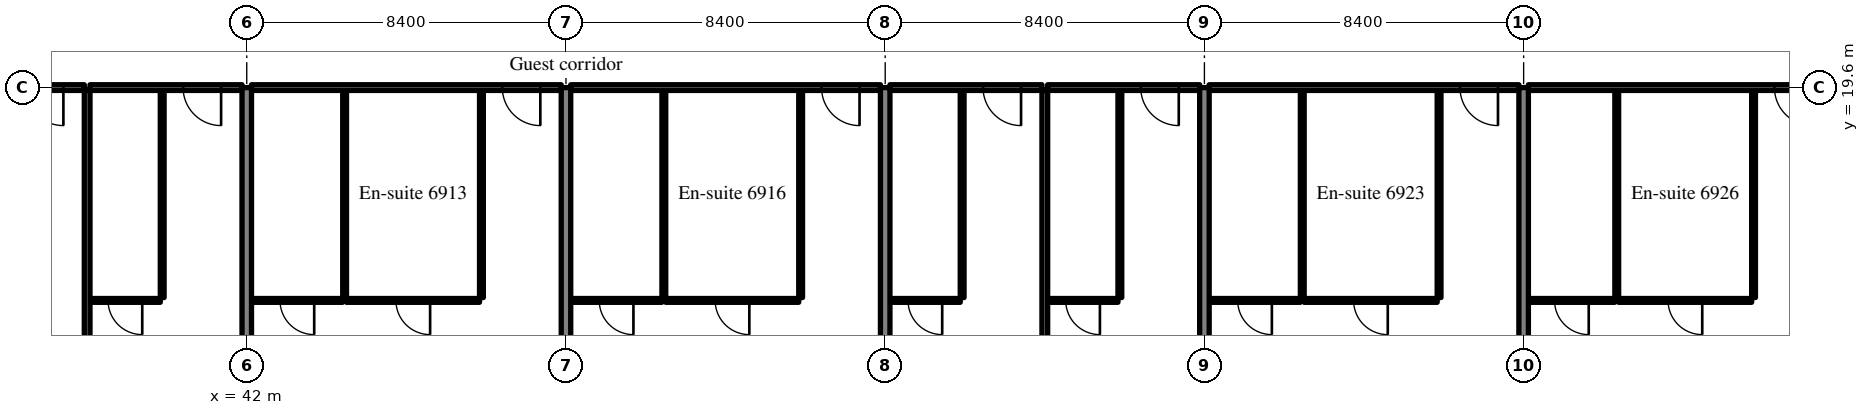
"""IFC4 building model, lengths in metres.
Left out: names, types, materials, properties, quantities, classifications, styles, units other than length and angle.
Written with IfcOpenShell. Run it as: python <this file> out.ifc"""

import sys

from ifc_helpers import new_model, si_unit, direction, frame, frame_2d, origin, place, context, subcontext, project, spatial, rectangle, extrude, source, transform, mapped, element, fill, save


model = new_model("IFC4")
c1 = context("Model", 3, precision=1e-05, world=origin(), true_north=direction((0.0, 1.0)))
c2 = subcontext(c1, "Body", "Model", "MODEL_VIEW")
j1 = project(units=[si_unit("LENGTHUNIT", "METRE"), si_unit("PLANEANGLEUNIT", "RADIAN")], contexts=[c1])
p1 = place(None, origin())
s1 = spatial("IfcSite", under=j1, at=p1, CompositionType="ELEMENT")
p2 = place(p1, origin())
s2 = spatial("IfcBuilding", under=s1, at=p2, CompositionType="ELEMENT")
p3 = place(p2, frame((0.0, 0.0, 289.7)))
s3 = spatial("IfcBuildingStorey", under=s2, at=p3, CompositionType="ELEMENT", Elevation=289.7)
m1 = source(origin(), c2, "Body", "SweptSolid", [
    extrude(rectangle(XDim=14.1, YDim=0.25, at=frame_2d((7.05, 0.0))), origin(), (0.0, 0.0, 1.0), 3.72),
])
p4 = place(p3, frame((42.0, 5.5, 0.0), z_axis=(0.0, 0.0, 1.0), x_axis=(0.0, 1.0, 0.0)))
e1 = element("IfcWall", 1, at=p4, inside=s3, PredefinedType="SHEAR", context=c2, shape_type="MappedRepresentation", body=[
    mapped(m1, transform((0.0, 0.0, 0.0), scale=1.0)),
])
m2 = source(origin(), c2, "Body", "SweptSolid", [
    extrude(rectangle(XDim=13.1, YDim=0.25, at=frame_2d((6.55, 0.0))), origin(), (0.0, 0.0, 1.0), 3.72),
])
p5 = place(p3, frame((50.4, 6.5, 0.0), z_axis=(0.0, 0.0, 1.0), x_axis=(0.0, 1.0, 0.0)))
e2 = element("IfcWall", 2, at=p5, inside=s3, PredefinedType="SHEAR", context=c2, shape_type="MappedRepresentation", body=[
    mapped(m2, transform((0.0, 0.0, 0.0), scale=1.0)),
])
for number, where, z_axis, x_axis in (
    (3, (58.8, 5.5, 0.0), (0.0, 0.0, 1.0), (0.0, 1.0, 0.0)),
    (4, (67.2, 5.5, 0.0), (0.0, 0.0, 1.0), (0.0, 1.0, 0.0)),
    (5, (75.6, 5.5, 0.0), (0.0, 0.0, 1.0), (0.0, 1.0, 0.0)),
):
    element("IfcWall", number, at=place(p3, frame(where, z_axis=z_axis, x_axis=x_axis)), inside=s3, PredefinedType="SHEAR", context=c2, shape_type="MappedRepresentation", body=[
        mapped(m1, transform((0.0, 0.0, 0.0), scale=1.0)),
    ])
m3 = source(origin(), c2, "Body", "SweptSolid", [
    extrude(rectangle(XDim=4.0, YDim=0.15, at=frame_2d((2.0, 0.0))), origin(), (0.0, 0.0, 1.0), 3.02),
])
p6 = place(p3, frame((33.725, 19.6, 0.0), z_axis=(0.0, 0.0, 1.0), x_axis=(1.0, 0.0, 0.0)))
e6 = element("IfcWall", 6, at=p6, inside=s3, PredefinedType="PARTITIONING", context=c2, shape_type="MappedRepresentation", body=[
    mapped(m3, transform((0.0, 0.0, 0.0), scale=1.0)),
])
m4 = source(origin(), c2, "Body", "SweptSolid", [
    extrude(rectangle(XDim=1.0, YDim=2.1, at=frame_2d((0.5, 1.05))), frame((0.0, 0.085, 0.0), z_axis=(0.0, -1.0, 0.0), x_axis=(1.0, 0.0, 0.0)), (0.0, 0.0, 1.0), 0.17),
])
p7 = place(p6, frame((2.45, 0.0, 0.0)))
e7 = element("IfcOpeningElement", 7, at=p7, cuts=e6, PredefinedType="OPENING", context=c2, shape_type="MappedRepresentation", body=[
    mapped(m4, transform((0.0, 0.0, 0.0), scale=1.0)),
])
m5 = source(origin(), c2, "Body", "SweptSolid", [
    extrude(rectangle(XDim=5.45, YDim=0.1, at=frame_2d((2.725, 0.0))), origin(), (0.0, 0.0, 1.0), 3.72),
])
p8 = place(p3, frame((39.775, 14.075, 0.0), z_axis=(0.0, 0.0, 1.0), x_axis=(0.0, 1.0, 0.0)))
e8 = element("IfcWall", 8, at=p8, inside=s3, PredefinedType="PARTITIONING", context=c2, shape_type="MappedRepresentation", body=[
    mapped(m5, transform((0.0, 0.0, 0.0), scale=1.0)),
])
m6 = source(origin(), c2, "Body", "SweptSolid", [
    extrude(rectangle(XDim=1.85, YDim=0.1, at=frame_2d((0.925, 0.0))), origin(), (0.0, 0.0, 1.0), 3.72),
])
p9 = place(p3, frame((37.875, 14.0, 0.0), z_axis=(0.0, 0.0, 1.0), x_axis=(1.0, 0.0, 0.0)))
e9 = element("IfcWall", 9, at=p9, inside=s3, PredefinedType="PARTITIONING", context=c2, shape_type="MappedRepresentation", body=[
    mapped(m6, transform((0.0, 0.0, 0.0), scale=1.0)),
])
m7 = source(origin(), c2, "Body", "SweptSolid", [
    extrude(rectangle(XDim=0.9, YDim=2.1, at=frame_2d((0.45, 1.05))), frame((0.0, 0.06, 0.0), z_axis=(0.0, -1.0, 0.0), x_axis=(1.0, 0.0, 0.0)), (0.0, 0.0, 1.0), 0.12),
])
p10 = place(p9, frame((0.475, 0.0, 0.0)))
e10 = element("IfcOpeningElement", 10, at=p10, cuts=e9, PredefinedType="OPENING", context=c2, shape_type="MappedRepresentation", body=[
    mapped(m7, transform((0.0, 0.0, 0.0), scale=1.0)),
])
p11 = place(p3, frame((37.875, 19.6, 0.0), z_axis=(0.0, 0.0, 1.0), x_axis=(1.0, 0.0, 0.0)))
e11 = element("IfcWall", 11, at=p11, inside=s3, PredefinedType="PARTITIONING", context=c2, shape_type="MappedRepresentation", body=[
    mapped(m3, transform((0.0, 0.0, 0.0), scale=1.0)),
])
p12 = place(p11, frame((2.45, 0.0, 0.0)))
e12 = element("IfcOpeningElement", 12, at=p12, cuts=e11, PredefinedType="OPENING", context=c2, shape_type="MappedRepresentation", body=[
    mapped(m4, transform((0.0, 0.0, 0.0), scale=1.0)),
])
m8 = source(origin(), c2, "Body", "SweptSolid", [
    extrude(rectangle(XDim=15.498, YDim=0.15, at=frame_2d((7.749, 0.0))), origin(), (0.0, 0.0, 1.0), 3.72),
])
p13 = place(p3, frame((37.8, 4.027, 0.0), z_axis=(0.0, 0.0, 1.0), x_axis=(0.0, 1.0, 0.0)))
e13 = element("IfcWall", 13, at=p13, inside=s3, PredefinedType="PARTITIONING", context=c2, shape_type="MappedRepresentation", body=[
    mapped(m8, transform((0.0, 0.0, 0.0), scale=1.0)),
])
for number, where, z_axis, x_axis in (
    (14, (48.175, 14.075, 0.0), (0.0, 0.0, 1.0), (0.0, 1.0, 0.0)),
    (15, (44.575, 14.075, 0.0), (0.0, 0.0, 1.0), (0.0, 1.0, 0.0)),
):
    element("IfcWall", number, at=place(p3, frame(where, z_axis=z_axis, x_axis=x_axis)), inside=s3, PredefinedType="PARTITIONING", context=c2, shape_type="MappedRepresentation", body=[
        mapped(m5, transform((0.0, 0.0, 0.0), scale=1.0)),
    ])
m9 = source(origin(), c2, "Body", "SweptSolid", [
    extrude(rectangle(XDim=3.5, YDim=0.1, at=frame_2d((1.75, 0.0))), origin(), (0.0, 0.0, 1.0), 3.72),
])
p14 = place(p3, frame((44.625, 14.0, 0.0), z_axis=(0.0, 0.0, 1.0), x_axis=(1.0, 0.0, 0.0)))
e16 = element("IfcWall", 16, at=p14, inside=s3, PredefinedType="PARTITIONING", context=c2, shape_type="MappedRepresentation", body=[
    mapped(m9, transform((0.0, 0.0, 0.0), scale=1.0)),
])
p15 = place(p14, frame((1.3, 0.0, 0.0)))
e17 = element("IfcOpeningElement", 17, at=p15, cuts=e16, PredefinedType="OPENING", context=c2, shape_type="MappedRepresentation", body=[
    mapped(m7, transform((0.0, 0.0, 0.0), scale=1.0)),
])
m10 = source(origin(), c2, "Body", "SweptSolid", [
    extrude(rectangle(XDim=2.4, YDim=0.1, at=frame_2d((1.2, 0.0))), origin(), (0.0, 0.0, 1.0), 3.72),
])
p16 = place(p3, frame((42.125, 14.0, 0.0), z_axis=(0.0, 0.0, 1.0), x_axis=(1.0, 0.0, 0.0)))
e18 = element("IfcWall", 18, at=p16, inside=s3, PredefinedType="PARTITIONING", context=c2, shape_type="MappedRepresentation", body=[
    mapped(m10, transform((0.0, 0.0, 0.0), scale=1.0)),
])
p17 = place(p16, frame((0.75, 0.0, 0.0)))
e19 = element("IfcOpeningElement", 19, at=p17, cuts=e18, PredefinedType="OPENING", context=c2, shape_type="MappedRepresentation", body=[
    mapped(m7, transform((0.0, 0.0, 0.0), scale=1.0)),
])
m11 = source(origin(), c2, "Body", "SweptSolid", [
    extrude(rectangle(XDim=8.15, YDim=0.15, at=frame_2d((4.075, 0.0))), origin(), (0.0, 0.0, 1.0), 3.02),
])
p18 = place(p3, frame((42.125, 19.6, 0.0), z_axis=(0.0, 0.0, 1.0), x_axis=(1.0, 0.0, 0.0)))
e20 = element("IfcWall", 20, at=p18, inside=s3, PredefinedType="PARTITIONING", context=c2, shape_type="MappedRepresentation", body=[
    mapped(m11, transform((0.0, 0.0, 0.0), scale=1.0)),
])
p19 = place(p18, frame((6.6, 0.0, 0.0)))
e21 = element("IfcOpeningElement", 21, at=p19, cuts=e20, PredefinedType="OPENING", context=c2, shape_type="MappedRepresentation", body=[
    mapped(m4, transform((0.0, 0.0, 0.0), scale=1.0)),
])
for number, where, z_axis, x_axis in (
    (22, (56.575, 14.075, 0.0), (0.0, 0.0, 1.0), (0.0, 1.0, 0.0)),
    (23, (52.975, 14.075, 0.0), (0.0, 0.0, 1.0), (0.0, 1.0, 0.0)),
):
    element("IfcWall", number, at=place(p3, frame(where, z_axis=z_axis, x_axis=x_axis)), inside=s3, PredefinedType="PARTITIONING", context=c2, shape_type="MappedRepresentation", body=[
        mapped(m5, transform((0.0, 0.0, 0.0), scale=1.0)),
    ])
p20 = place(p3, frame((53.025, 14.0, 0.0), z_axis=(0.0, 0.0, 1.0), x_axis=(1.0, 0.0, 0.0)))
e24 = element("IfcWall", 24, at=p20, inside=s3, PredefinedType="PARTITIONING", context=c2, shape_type="MappedRepresentation", body=[
    mapped(m9, transform((0.0, 0.0, 0.0), scale=1.0)),
])
p21 = place(p20, frame((1.3, 0.0, 0.0)))
e25 = element("IfcOpeningElement", 25, at=p21, cuts=e24, PredefinedType="OPENING", context=c2, shape_type="MappedRepresentation", body=[
    mapped(m7, transform((0.0, 0.0, 0.0), scale=1.0)),
])
m12 = source(origin(), c2, "Body", "SweptSolid", [
    extrude(rectangle(XDim=2.4, YDim=0.1, at=frame_2d((1.2, 0.0))), origin(), (0.0, 0.0, 1.0), 3.72),
])
p22 = place(p3, frame((50.525, 14.0, 0.0), z_axis=(0.0, 0.0, 1.0), x_axis=(1.0, 0.0, 0.0)))
e26 = element("IfcWall", 26, at=p22, inside=s3, PredefinedType="PARTITIONING", context=c2, shape_type="MappedRepresentation", body=[
    mapped(m12, transform((0.0, 0.0, 0.0), scale=1.0)),
])
p23 = place(p22, frame((0.75, 0.0, 0.0)))
e27 = element("IfcOpeningElement", 27, at=p23, cuts=e26, PredefinedType="OPENING", context=c2, shape_type="MappedRepresentation", body=[
    mapped(m7, transform((0.0, 0.0, 0.0), scale=1.0)),
])
m13 = source(origin(), c2, "Body", "SweptSolid", [
    extrude(rectangle(XDim=8.15, YDim=0.15, at=frame_2d((4.075, 0.0))), origin(), (0.0, 0.0, 1.0), 3.02),
])
p24 = place(p3, frame((50.525, 19.6, 0.0), z_axis=(0.0, 0.0, 1.0), x_axis=(1.0, 0.0, 0.0)))
e28 = element("IfcWall", 28, at=p24, inside=s3, PredefinedType="PARTITIONING", context=c2, shape_type="MappedRepresentation", body=[
    mapped(m13, transform((0.0, 0.0, 0.0), scale=1.0)),
])
p25 = place(p24, frame((6.6, 0.0, 0.0)))
e29 = element("IfcOpeningElement", 29, at=p25, cuts=e28, PredefinedType="OPENING", context=c2, shape_type="MappedRepresentation", body=[
    mapped(m4, transform((0.0, 0.0, 0.0), scale=1.0)),
])
p26 = place(p3, frame((60.825, 14.075, 0.0), z_axis=(0.0, 0.0, 1.0), x_axis=(0.0, 1.0, 0.0)))
e30 = element("IfcWall", 30, at=p26, inside=s3, PredefinedType="PARTITIONING", context=c2, shape_type="MappedRepresentation", body=[
    mapped(m5, transform((0.0, 0.0, 0.0), scale=1.0)),
])
m14 = source(origin(), c2, "Body", "SweptSolid", [
    extrude(rectangle(XDim=1.85, YDim=0.1, at=frame_2d((0.925, 0.0))), origin(), (0.0, 0.0, 1.0), 3.72),
])
p27 = place(p3, frame((58.925, 14.0, 0.0), z_axis=(0.0, 0.0, 1.0), x_axis=(1.0, 0.0, 0.0)))
e31 = element("IfcWall", 31, at=p27, inside=s3, PredefinedType="PARTITIONING", context=c2, shape_type="MappedRepresentation", body=[
    mapped(m14, transform((0.0, 0.0, 0.0), scale=1.0)),
])
p28 = place(p27, frame((0.475, 0.0, 0.0)))
e32 = element("IfcOpeningElement", 32, at=p28, cuts=e31, PredefinedType="OPENING", context=c2, shape_type="MappedRepresentation", body=[
    mapped(m7, transform((0.0, 0.0, 0.0), scale=1.0)),
])
p29 = place(p3, frame((58.925, 19.6, 0.0), z_axis=(0.0, 0.0, 1.0), x_axis=(1.0, 0.0, 0.0)))
e33 = element("IfcWall", 33, at=p29, inside=s3, PredefinedType="PARTITIONING", context=c2, shape_type="MappedRepresentation", body=[
    mapped(m3, transform((0.0, 0.0, 0.0), scale=1.0)),
])
p30 = place(p29, frame((2.45, 0.0, 0.0)))
e34 = element("IfcOpeningElement", 34, at=p30, cuts=e33, PredefinedType="OPENING", context=c2, shape_type="MappedRepresentation", body=[
    mapped(m4, transform((0.0, 0.0, 0.0), scale=1.0)),
])
p31 = place(p3, frame((64.975, 14.075, 0.0), z_axis=(0.0, 0.0, 1.0), x_axis=(0.0, 1.0, 0.0)))
e35 = element("IfcWall", 35, at=p31, inside=s3, PredefinedType="PARTITIONING", context=c2, shape_type="MappedRepresentation", body=[
    mapped(m5, transform((0.0, 0.0, 0.0), scale=1.0)),
])
p32 = place(p3, frame((63.075, 14.0, 0.0), z_axis=(0.0, 0.0, 1.0), x_axis=(1.0, 0.0, 0.0)))
e36 = element("IfcWall", 36, at=p32, inside=s3, PredefinedType="PARTITIONING", context=c2, shape_type="MappedRepresentation", body=[
    mapped(m6, transform((0.0, 0.0, 0.0), scale=1.0)),
])
p33 = place(p32, frame((0.475, 0.0, 0.0)))
e37 = element("IfcOpeningElement", 37, at=p33, cuts=e36, PredefinedType="OPENING", context=c2, shape_type="MappedRepresentation", body=[
    mapped(m7, transform((0.0, 0.0, 0.0), scale=1.0)),
])
p34 = place(p3, frame((63.075, 19.6, 0.0), z_axis=(0.0, 0.0, 1.0), x_axis=(1.0, 0.0, 0.0)))
e38 = element("IfcWall", 38, at=p34, inside=s3, PredefinedType="PARTITIONING", context=c2, shape_type="MappedRepresentation", body=[
    mapped(m3, transform((0.0, 0.0, 0.0), scale=1.0)),
])
p35 = place(p34, frame((2.45, 0.0, 0.0)))
e39 = element("IfcOpeningElement", 39, at=p35, cuts=e38, PredefinedType="OPENING", context=c2, shape_type="MappedRepresentation", body=[
    mapped(m4, transform((0.0, 0.0, 0.0), scale=1.0)),
])
p36 = place(p3, frame((63.0, 4.027, 0.0), z_axis=(0.0, 0.0, 1.0), x_axis=(0.0, 1.0, 0.0)))
e40 = element("IfcWall", 40, at=p36, inside=s3, PredefinedType="PARTITIONING", context=c2, shape_type="MappedRepresentation", body=[
    mapped(m8, transform((0.0, 0.0, 0.0), scale=1.0)),
])
for number, where, z_axis, x_axis in (
    (41, (73.375, 14.075, 0.0), (0.0, 0.0, 1.0), (0.0, 1.0, 0.0)),
    (42, (69.775, 14.075, 0.0), (0.0, 0.0, 1.0), (0.0, 1.0, 0.0)),
):
    element("IfcWall", number, at=place(p3, frame(where, z_axis=z_axis, x_axis=x_axis)), inside=s3, PredefinedType="PARTITIONING", context=c2, shape_type="MappedRepresentation", body=[
        mapped(m5, transform((0.0, 0.0, 0.0), scale=1.0)),
    ])
p37 = place(p3, frame((69.825, 14.0, 0.0), z_axis=(0.0, 0.0, 1.0), x_axis=(1.0, 0.0, 0.0)))
e43 = element("IfcWall", 43, at=p37, inside=s3, PredefinedType="PARTITIONING", context=c2, shape_type="MappedRepresentation", body=[
    mapped(m9, transform((0.0, 0.0, 0.0), scale=1.0)),
])
p38 = place(p37, frame((1.3, 0.0, 0.0)))
e44 = element("IfcOpeningElement", 44, at=p38, cuts=e43, PredefinedType="OPENING", context=c2, shape_type="MappedRepresentation", body=[
    mapped(m7, transform((0.0, 0.0, 0.0), scale=1.0)),
])
p39 = place(p3, frame((67.325, 14.0, 0.0), z_axis=(0.0, 0.0, 1.0), x_axis=(1.0, 0.0, 0.0)))
e45 = element("IfcWall", 45, at=p39, inside=s3, PredefinedType="PARTITIONING", context=c2, shape_type="MappedRepresentation", body=[
    mapped(m12, transform((0.0, 0.0, 0.0), scale=1.0)),
])
p40 = place(p39, frame((0.75, 0.0, 0.0)))
e46 = element("IfcOpeningElement", 46, at=p40, cuts=e45, PredefinedType="OPENING", context=c2, shape_type="MappedRepresentation", body=[
    mapped(m7, transform((0.0, 0.0, 0.0), scale=1.0)),
])
p41 = place(p3, frame((67.325, 19.6, 0.0), z_axis=(0.0, 0.0, 1.0), x_axis=(1.0, 0.0, 0.0)))
e47 = element("IfcWall", 47, at=p41, inside=s3, PredefinedType="PARTITIONING", context=c2, shape_type="MappedRepresentation", body=[
    mapped(m13, transform((0.0, 0.0, 0.0), scale=1.0)),
])
p42 = place(p41, frame((6.6, 0.0, 0.0)))
e48 = element("IfcOpeningElement", 48, at=p42, cuts=e47, PredefinedType="OPENING", context=c2, shape_type="MappedRepresentation", body=[
    mapped(m4, transform((0.0, 0.0, 0.0), scale=1.0)),
])
for number, where, z_axis, x_axis in (
    (49, (81.65, 14.075, 0.0), (0.0, 0.0, 1.0), (0.0, 1.0, 0.0)),
    (50, (78.05, 14.075, 0.0), (0.0, 0.0, 1.0), (0.0, 1.0, 0.0)),
):
    element("IfcWall", number, at=place(p3, frame(where, z_axis=z_axis, x_axis=x_axis)), inside=s3, PredefinedType="PARTITIONING", context=c2, shape_type="MappedRepresentation", body=[
        mapped(m5, transform((0.0, 0.0, 0.0), scale=1.0)),
    ])
p43 = place(p3, frame((78.1, 14.0, 0.0), z_axis=(0.0, 0.0, 1.0), x_axis=(1.0, 0.0, 0.0)))
e51 = element("IfcWall", 51, at=p43, inside=s3, PredefinedType="PARTITIONING", context=c2, shape_type="MappedRepresentation", body=[
    mapped(m9, transform((0.0, 0.0, 0.0), scale=1.0)),
])
p44 = place(p43, frame((1.3, 0.0, 0.0)))
e52 = element("IfcOpeningElement", 52, at=p44, cuts=e51, PredefinedType="OPENING", context=c2, shape_type="MappedRepresentation", body=[
    mapped(m7, transform((0.0, 0.0, 0.0), scale=1.0)),
])
m15 = source(origin(), c2, "Body", "SweptSolid", [
    extrude(rectangle(XDim=2.275, YDim=0.1, at=frame_2d((1.137, 0.0))), origin(), (0.0, 0.0, 1.0), 3.72),
])
p45 = place(p3, frame((75.725, 14.0, 0.0), z_axis=(0.0, 0.0, 1.0), x_axis=(1.0, 0.0, 0.0)))
e53 = element("IfcWall", 53, at=p45, inside=s3, PredefinedType="PARTITIONING", context=c2, shape_type="MappedRepresentation", body=[
    mapped(m15, transform((0.0, 0.0, 0.0), scale=1.0)),
])
p46 = place(p45, frame((0.688, 0.0, 0.0)))
e54 = element("IfcOpeningElement", 54, at=p46, cuts=e53, PredefinedType="OPENING", context=c2, shape_type="MappedRepresentation", body=[
    mapped(m7, transform((0.0, 0.0, 0.0), scale=1.0)),
])
m16 = source(origin(), c2, "Body", "SweptSolid", [
    extrude(rectangle(XDim=8.025, YDim=0.15, at=frame_2d((4.012, 0.0))), origin(), (0.0, 0.0, 1.0), 3.02),
])
p47 = place(p3, frame((75.725, 19.6, 0.0), z_axis=(0.0, 0.0, 1.0), x_axis=(1.0, 0.0, 0.0)))
e55 = element("IfcWall", 55, at=p47, inside=s3, PredefinedType="PARTITIONING", context=c2, shape_type="MappedRepresentation", body=[
    mapped(m16, transform((0.0, 0.0, 0.0), scale=1.0)),
])
p48 = place(p47, frame((6.475, 0.0, 0.0)))
e56 = element("IfcOpeningElement", 56, at=p48, cuts=e55, PredefinedType="OPENING", context=c2, shape_type="MappedRepresentation", body=[
    mapped(m4, transform((0.0, 0.0, 0.0), scale=1.0)),
])
m17 = source(origin(), c2, "Body", "SweptSolid", [
    extrude(rectangle(XDim=1.0, YDim=2.1, at=frame_2d((0.5, 1.05))), frame((0.0, 0.025, 0.0), z_axis=(0.0, -1.0, 0.0), x_axis=(1.0, 0.0, 0.0)), (0.0, 0.0, 1.0), 0.05),
])
p49 = place(p7, origin())
e57 = element("IfcDoor", 57, at=p49, inside=s3, OperationType="SINGLE_SWING_RIGHT", PredefinedType="DOOR", context=c2, shape_type="MappedRepresentation", body=[
    mapped(m17, transform((0.0, 0.0, 0.0), scale=1.0)),
])
fill(e7, e57)
m18 = source(origin(), c2, "Body", "SweptSolid", [
    extrude(rectangle(XDim=0.9, YDim=2.1, at=frame_2d((0.45, 1.05))), frame((0.0, 0.025, 0.0), z_axis=(0.0, -1.0, 0.0), x_axis=(1.0, 0.0, 0.0)), (0.0, 0.0, 1.0), 0.05),
])
p50 = place(p10, origin())
e58 = element("IfcDoor", 58, at=p50, inside=s3, OperationType="SINGLE_SWING_RIGHT", PredefinedType="DOOR", context=c2, shape_type="MappedRepresentation", body=[
    mapped(m18, transform((0.0, 0.0, 0.0), scale=1.0)),
])
fill(e10, e58)
p51 = place(p12, origin())
e59 = element("IfcDoor", 59, at=p51, inside=s3, OperationType="SINGLE_SWING_RIGHT", PredefinedType="DOOR", context=c2, shape_type="MappedRepresentation", body=[
    mapped(m17, transform((0.0, 0.0, 0.0), scale=1.0)),
])
fill(e12, e59)
p52 = place(p15, origin())
e60 = element("IfcDoor", 60, at=p52, inside=s3, OperationType="SINGLE_SWING_RIGHT", PredefinedType="DOOR", context=c2, shape_type="MappedRepresentation", body=[
    mapped(m18, transform((0.0, 0.0, 0.0), scale=1.0)),
])
fill(e17, e60)
p53 = place(p17, origin())
e61 = element("IfcDoor", 61, at=p53, inside=s3, OperationType="SINGLE_SWING_RIGHT", PredefinedType="DOOR", context=c2, shape_type="MappedRepresentation", body=[
    mapped(m18, transform((0.0, 0.0, 0.0), scale=1.0)),
])
fill(e19, e61)
p54 = place(p19, origin())
e62 = element("IfcDoor", 62, at=p54, inside=s3, OperationType="SINGLE_SWING_RIGHT", PredefinedType="DOOR", context=c2, shape_type="MappedRepresentation", body=[
    mapped(m17, transform((0.0, 0.0, 0.0), scale=1.0)),
])
fill(e21, e62)
p55 = place(p21, origin())
e63 = element("IfcDoor", 63, at=p55, inside=s3, OperationType="SINGLE_SWING_RIGHT", PredefinedType="DOOR", context=c2, shape_type="MappedRepresentation", body=[
    mapped(m18, transform((0.0, 0.0, 0.0), scale=1.0)),
])
fill(e25, e63)
p56 = place(p23, origin())
e64 = element("IfcDoor", 64, at=p56, inside=s3, OperationType="SINGLE_SWING_RIGHT", PredefinedType="DOOR", context=c2, shape_type="MappedRepresentation", body=[
    mapped(m18, transform((0.0, 0.0, 0.0), scale=1.0)),
])
fill(e27, e64)
p57 = place(p25, origin())
e65 = element("IfcDoor", 65, at=p57, inside=s3, OperationType="SINGLE_SWING_RIGHT", PredefinedType="DOOR", context=c2, shape_type="MappedRepresentation", body=[
    mapped(m17, transform((0.0, 0.0, 0.0), scale=1.0)),
])
fill(e29, e65)
p58 = place(p28, origin())
e66 = element("IfcDoor", 66, at=p58, inside=s3, OperationType="SINGLE_SWING_RIGHT", PredefinedType="DOOR", context=c2, shape_type="MappedRepresentation", body=[
    mapped(m18, transform((0.0, 0.0, 0.0), scale=1.0)),
])
fill(e32, e66)
p59 = place(p30, origin())
e67 = element("IfcDoor", 67, at=p59, inside=s3, OperationType="SINGLE_SWING_RIGHT", PredefinedType="DOOR", context=c2, shape_type="MappedRepresentation", body=[
    mapped(m17, transform((0.0, 0.0, 0.0), scale=1.0)),
])
fill(e34, e67)
p60 = place(p33, origin())
e68 = element("IfcDoor", 68, at=p60, inside=s3, OperationType="SINGLE_SWING_RIGHT", PredefinedType="DOOR", context=c2, shape_type="MappedRepresentation", body=[
    mapped(m18, transform((0.0, 0.0, 0.0), scale=1.0)),
])
fill(e37, e68)
p61 = place(p35, origin())
e69 = element("IfcDoor", 69, at=p61, inside=s3, OperationType="SINGLE_SWING_RIGHT", PredefinedType="DOOR", context=c2, shape_type="MappedRepresentation", body=[
    mapped(m17, transform((0.0, 0.0, 0.0), scale=1.0)),
])
fill(e39, e69)
p62 = place(p38, origin())
e70 = element("IfcDoor", 70, at=p62, inside=s3, OperationType="SINGLE_SWING_RIGHT", PredefinedType="DOOR", context=c2, shape_type="MappedRepresentation", body=[
    mapped(m18, transform((0.0, 0.0, 0.0), scale=1.0)),
])
fill(e44, e70)
p63 = place(p40, origin())
e71 = element("IfcDoor", 71, at=p63, inside=s3, OperationType="SINGLE_SWING_RIGHT", PredefinedType="DOOR", context=c2, shape_type="MappedRepresentation", body=[
    mapped(m18, transform((0.0, 0.0, 0.0), scale=1.0)),
])
fill(e46, e71)
p64 = place(p42, origin())
e72 = element("IfcDoor", 72, at=p64, inside=s3, OperationType="SINGLE_SWING_RIGHT", PredefinedType="DOOR", context=c2, shape_type="MappedRepresentation", body=[
    mapped(m17, transform((0.0, 0.0, 0.0), scale=1.0)),
])
fill(e48, e72)
p65 = place(p44, origin())
e73 = element("IfcDoor", 73, at=p65, inside=s3, OperationType="SINGLE_SWING_RIGHT", PredefinedType="DOOR", context=c2, shape_type="MappedRepresentation", body=[
    mapped(m18, transform((0.0, 0.0, 0.0), scale=1.0)),
])
fill(e52, e73)
p66 = place(p46, origin())
e74 = element("IfcDoor", 74, at=p66, inside=s3, OperationType="SINGLE_SWING_RIGHT", PredefinedType="DOOR", context=c2, shape_type="MappedRepresentation", body=[
    mapped(m18, transform((0.0, 0.0, 0.0), scale=1.0)),
])
fill(e54, e74)
p67 = place(p48, origin())
e75 = element("IfcDoor", 75, at=p67, inside=s3, OperationType="SINGLE_SWING_RIGHT", PredefinedType="DOOR", context=c2, shape_type="MappedRepresentation", body=[
    mapped(m17, transform((0.0, 0.0, 0.0), scale=1.0)),
])
fill(e56, e75)
save(model, sys.argv[1])
